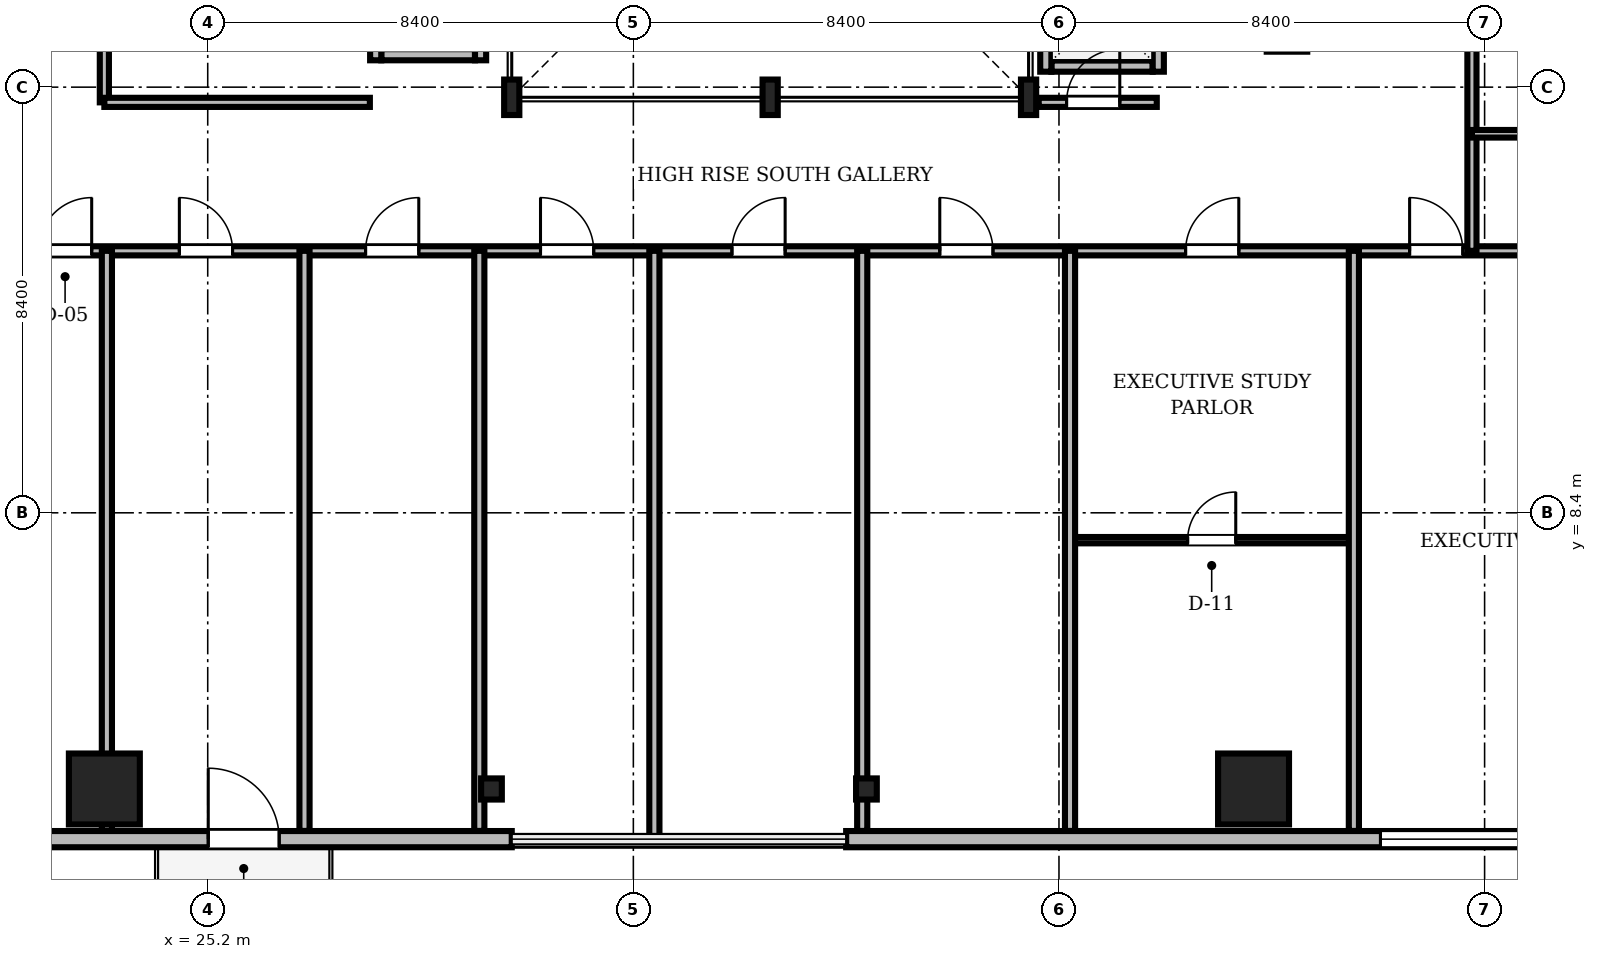
"""IFC4 building model, lengths in metres.
Left out: names, types, materials, properties, quantities, classifications, styles, units other than length and angle.
Written with IfcOpenShell. Run it as: python <this file> out.ifc"""

import sys

from ifc_helpers import new_model, si_unit, direction, frame, frame_2d, origin, origin_2d, place, context, subcontext, project, spatial, rectangle, i_section, extrude, source, transform, mapped, element, fill, save


model = new_model("IFC4")
c1 = context("Model", 3, precision=1e-05, world=origin(), true_north=direction((0.0, 1.0)))
c2 = subcontext(c1, "Body", "Model", "MODEL_VIEW")
j1 = project(units=[si_unit("LENGTHUNIT", "METRE"), si_unit("PLANEANGLEUNIT", "RADIAN")], contexts=[c1])
p1 = place(None, origin())
s1 = spatial("IfcSite", under=j1, at=p1, CompositionType="ELEMENT")
p2 = place(p1, origin())
s2 = spatial("IfcBuilding", under=s1, at=p2, CompositionType="ELEMENT")
p3 = place(p2, frame((0.0, 0.0, 218.55)))
s3 = spatial("IfcBuildingStorey", under=s2, at=p3, CompositionType="ELEMENT", Elevation=218.55)
m1 = source(origin(), c2, "Body", "SweptSolid", [
    extrude(i_section(OverallWidth=0.3, OverallDepth=0.7, WebThickness=0.017, FlangeThickness=0.032, FilletRadius=0.027, at=origin_2d()), origin(), (0.0, 0.0, 1.0), 3.53),
])
for number, where, z_axis, x_axis in (
    (1, (31.2, 16.6, 0.0), (0.0, 0.0, 1.0), (1.0, 0.0, 0.0)),
    (2, (36.3, 16.6, 0.0), (0.0, 0.0, 1.0), (1.0, 0.0, 0.0)),
    (3, (41.4, 16.6, 0.0), (0.0, 0.0, 1.0), (1.0, 0.0, 0.0)),
):
    element("IfcColumn", number, at=place(p3, frame(where, z_axis=z_axis, x_axis=x_axis)), inside=s3, PredefinedType="COLUMN", context=c2, shape_type="MappedRepresentation", body=[
        mapped(m1, transform((0.0, 0.0, 0.0), scale=1.0)),
    ])
m2 = source(origin(), c2, "Body", "SweptSolid", [
    extrude(rectangle(XDim=1.4, YDim=1.4, at=origin_2d()), origin(), (0.0, 0.0, 1.0), 3.53),
])
for number, where, z_axis, x_axis in (
    (4, (23.16, 2.95, 0.0), (0.0, 0.0, 1.0), (1.0, 0.0, 0.0)),
    (5, (45.84, 2.95, 0.0), (0.0, 0.0, 1.0), (1.0, 0.0, 0.0)),
):
    element("IfcColumn", number, at=place(p3, frame(where, z_axis=z_axis, x_axis=x_axis)), inside=s3, PredefinedType="COLUMN", context=c2, shape_type="MappedRepresentation", body=[
        mapped(m2, transform((0.0, 0.0, 0.0), scale=1.0)),
    ])
m3 = source(origin(), c2, "Body", "SweptSolid", [
    extrude(i_section(OverallWidth=0.409, OverallDepth=0.417, WebThickness=0.021, FlangeThickness=0.033, FilletRadius=0.015, at=origin_2d()), origin(), (0.0, 0.0, 1.0), 3.53),
])
for number, where, z_axis, x_axis in (
    (6, (30.8, 2.95, 0.0), (0.0, 0.0, 1.0), (1.0, 0.0, 0.0)),
    (7, (38.2, 2.95, 0.0), (0.0, 0.0, 1.0), (1.0, 0.0, 0.0)),
):
    element("IfcColumn", number, at=place(p3, frame(where, z_axis=z_axis, x_axis=x_axis)), inside=s3, PredefinedType="COLUMN", context=c2, shape_type="MappedRepresentation", body=[
        mapped(m3, transform((0.0, 0.0, 0.0), scale=1.0)),
    ])
m4 = source(origin(), c2, "Body", "SweptSolid", [
    extrude(rectangle(XDim=15.6, YDim=0.32, at=frame_2d((7.8, 0.0))), origin(), (0.0, 0.0, 1.0), 3.53),
])
p4 = place(p3, frame((15.6, 1.96, 0.0), z_axis=(0.0, 0.0, 1.0), x_axis=(1.0, 0.0, 0.0)))
e8 = element("IfcWall", 8, at=p4, inside=s3, PredefinedType="SOLIDWALL", context=c2, shape_type="MappedRepresentation", body=[
    mapped(m4, transform((0.0, 0.0, 0.0), scale=1.0)),
])
m5 = source(origin(), c2, "Body", "SweptSolid", [
    extrude(rectangle(XDim=1.4, YDim=2.3, at=frame_2d((0.7, 1.15))), frame((0.0, 0.17, 0.0), z_axis=(0.0, -1.0, 0.0), x_axis=(1.0, 0.0, 0.0)), (0.0, 0.0, 1.0), 0.34),
])
p5 = place(p4, frame((9.61, 0.0, 0.0)))
e9 = element("IfcOpeningElement", 9, at=p5, cuts=e8, PredefinedType="OPENING", context=c2, shape_type="MappedRepresentation", body=[
    mapped(m5, transform((0.0, 0.0, 0.0), scale=1.0)),
])
m6 = source(origin(), c2, "Body", "SweptSolid", [
    extrude(rectangle(XDim=2.8, YDim=2.4, at=frame_2d((1.4, 1.2))), frame((0.0, 0.17, 0.0), z_axis=(0.0, -1.0, 0.0), x_axis=(1.0, 0.0, 0.0)), (0.0, 0.0, 1.0), 0.34),
])
p6 = place(p4, frame((2.705, 0.0, 0.72)))
e10 = element("IfcOpeningElement", 10, at=p6, cuts=e8, PredefinedType="OPENING", context=c2, shape_type="MappedRepresentation", body=[
    mapped(m6, transform((0.0, 0.0, 0.0), scale=1.0)),
])
p7 = place(p3, frame((37.8, 1.96, 0.0), z_axis=(0.0, 0.0, 1.0), x_axis=(1.0, 0.0, 0.0)))
e11 = element("IfcWall", 11, at=p7, inside=s3, PredefinedType="SOLIDWALL", context=c2, shape_type="MappedRepresentation", body=[
    mapped(m4, transform((0.0, 0.0, 0.0), scale=1.0)),
])
p8 = place(p7, frame((10.545, 0.0, 0.72)))
e12 = element("IfcOpeningElement", 12, at=p8, cuts=e11, PredefinedType="OPENING", context=c2, shape_type="MappedRepresentation", body=[
    mapped(m6, transform((0.0, 0.0, 0.0), scale=1.0)),
])
m7 = source(origin(), c2, "Body", "SweptSolid", [
    extrude(rectangle(XDim=2.0, YDim=0.22, at=frame_2d((1.0, 0.0))), origin(), (0.0, 0.0, 1.0), 3.53),
])
p9 = place(p3, frame((41.85, 17.215, 0.0), z_axis=(0.0, 0.0, 1.0), x_axis=(1.0, 0.0, 0.0)))
e13 = element("IfcWall", 13, at=p9, inside=s3, PredefinedType="SOLIDWALL", context=c2, shape_type="MappedRepresentation", body=[
    mapped(m7, transform((0.0, 0.0, 0.0), scale=1.0)),
])
m8 = source(origin(), c2, "Body", "SweptSolid", [
    extrude(rectangle(XDim=2.19, YDim=0.22, at=frame_2d((1.095, 0.0))), origin(), (0.0, 0.0, 1.0), 3.53),
])
p10 = place(p3, frame((41.74, 17.105, 0.0), z_axis=(0.0, 0.0, 1.0), x_axis=(0.0, 1.0, 0.0)))
e14 = element("IfcWall", 14, at=p10, inside=s3, PredefinedType="SOLIDWALL", context=c2, shape_type="MappedRepresentation", body=[
    mapped(m8, transform((0.0, 0.0, 0.0), scale=1.0)),
])
p11 = place(p3, frame((43.96, 17.105, 0.0), z_axis=(0.0, 0.0, 1.0), x_axis=(0.0, 1.0, 0.0)))
e15 = element("IfcWall", 15, at=p11, inside=s3, PredefinedType="SOLIDWALL", context=c2, shape_type="MappedRepresentation", body=[
    mapped(m8, transform((0.0, 0.0, 0.0), scale=1.0)),
])
m9 = source(origin(), c2, "Body", "SweptSolid", [
    extrude(rectangle(XDim=1.1, YDim=2.2, at=frame_2d((0.55, 1.1))), frame((0.0, 0.12, 0.0), z_axis=(0.0, -1.0, 0.0), x_axis=(1.0, 0.0, 0.0)), (0.0, 0.0, 1.0), 0.24),
])
p12 = place(p11, frame((0.545, 0.0, 0.0)))
e16 = element("IfcOpeningElement", 16, at=p12, cuts=e15, PredefinedType="OPENING", context=c2, shape_type="MappedRepresentation", body=[
    mapped(m9, transform((0.0, 0.0, 0.0), scale=1.0)),
])
m10 = source(origin(), c2, "Body", "SweptSolid", [
    extrude(rectangle(XDim=1.85, YDim=0.22, at=frame_2d((0.925, 0.0))), origin(), (0.0, 0.0, 1.0), 2.972),
])
p13 = place(p3, frame((28.625, 17.44, 0.0), z_axis=(0.0, 0.0, 1.0), x_axis=(1.0, 0.0, 0.0)))
e17 = element("IfcWall", 17, at=p13, inside=s3, PredefinedType="SOLIDWALL", context=c2, shape_type="MappedRepresentation", body=[
    mapped(m10, transform((0.0, 0.0, 0.0), scale=1.0)),
])
m11 = source(origin(), c2, "Body", "SweptSolid", [
    extrude(rectangle(XDim=2.54, YDim=0.22, at=frame_2d((1.27, 0.0))), origin(), (0.0, 0.0, 1.0), 2.972),
])
p14 = place(p3, frame((28.515, 17.33, 0.0), z_axis=(0.0, 0.0, 1.0), x_axis=(0.0, 1.0, 0.0)))
e18 = element("IfcWall", 18, at=p14, inside=s3, PredefinedType="SOLIDWALL", context=c2, shape_type="MappedRepresentation", body=[
    mapped(m11, transform((0.0, 0.0, 0.0), scale=1.0)),
])
m12 = source(origin(), c2, "Body", "SweptSolid", [
    extrude(rectangle(XDim=2.54, YDim=0.22, at=frame_2d((1.27, 0.0))), origin(), (0.0, 0.0, 1.0), 3.53),
])
p15 = place(p3, frame((30.585, 17.33, 0.0), z_axis=(0.0, 0.0, 1.0), x_axis=(0.0, 1.0, 0.0)))
e19 = element("IfcWall", 19, at=p15, inside=s3, PredefinedType="SOLIDWALL", context=c2, shape_type="MappedRepresentation", body=[
    mapped(m12, transform((0.0, 0.0, 0.0), scale=1.0)),
])
m13 = source(origin(), c2, "Body", "SweptSolid", [
    extrude(rectangle(XDim=46.156, YDim=0.18, at=frame_2d((23.078, 0.0))), origin(), (0.0, 0.0, 1.0), 2.772),
])
p16 = place(p3, frame((11.422, 13.57, 0.0), z_axis=(0.0, 0.0, 1.0), x_axis=(1.0, 0.0, 0.0)))
e20 = element("IfcWall", 20, at=p16, inside=s3, PredefinedType="PARTITIONING", context=c2, shape_type="MappedRepresentation", body=[
    mapped(m13, transform((0.0, 0.0, 0.0), scale=1.0)),
])
m14 = source(origin(), c2, "Body", "SweptSolid", [
    extrude(rectangle(XDim=1.05, YDim=2.2, at=frame_2d((0.525, 1.1))), frame((0.0, 0.1, 0.0), z_axis=(0.0, -1.0, 0.0), x_axis=(1.0, 0.0, 0.0)), (0.0, 0.0, 1.0), 0.2),
])
p17 = place(p16, frame((10.438, 0.0, 0.0)))
e21 = element("IfcOpeningElement", 21, at=p17, cuts=e20, PredefinedType="OPENING", context=c2, shape_type="MappedRepresentation", body=[
    mapped(m14, transform((0.0, 0.0, 0.0), scale=1.0)),
])
p18 = place(p16, frame((13.218, 0.0, 0.0)))
e22 = element("IfcOpeningElement", 22, at=p18, cuts=e20, PredefinedType="OPENING", context=c2, shape_type="MappedRepresentation", body=[
    mapped(m14, transform((0.0, 0.0, 0.0), scale=1.0)),
])
p19 = place(p16, frame((16.893, 0.0, 0.0)))
e23 = element("IfcOpeningElement", 23, at=p19, cuts=e20, PredefinedType="OPENING", context=c2, shape_type="MappedRepresentation", body=[
    mapped(m14, transform((0.0, 0.0, 0.0), scale=1.0)),
])
p20 = place(p16, frame((20.346, 0.0, 0.0)))
e24 = element("IfcOpeningElement", 24, at=p20, cuts=e20, PredefinedType="OPENING", context=c2, shape_type="MappedRepresentation", body=[
    mapped(m14, transform((0.0, 0.0, 0.0), scale=1.0)),
])
p21 = place(p16, frame((24.124, 0.0, 0.0)))
e25 = element("IfcOpeningElement", 25, at=p21, cuts=e20, PredefinedType="OPENING", context=c2, shape_type="MappedRepresentation", body=[
    mapped(m14, transform((0.0, 0.0, 0.0), scale=1.0)),
])
p22 = place(p16, frame((28.226, 0.0, 0.0)))
e26 = element("IfcOpeningElement", 26, at=p22, cuts=e20, PredefinedType="OPENING", context=c2, shape_type="MappedRepresentation", body=[
    mapped(m14, transform((0.0, 0.0, 0.0), scale=1.0)),
])
p23 = place(p16, frame((33.077, 0.0, 0.0)))
e27 = element("IfcOpeningElement", 27, at=p23, cuts=e20, PredefinedType="OPENING", context=c2, shape_type="MappedRepresentation", body=[
    mapped(m14, transform((0.0, 0.0, 0.0), scale=1.0)),
])
p24 = place(p16, frame((37.498, 0.0, 0.0)))
e28 = element("IfcOpeningElement", 28, at=p24, cuts=e20, PredefinedType="OPENING", context=c2, shape_type="MappedRepresentation", body=[
    mapped(m14, transform((0.0, 0.0, 0.0), scale=1.0)),
])
m15 = source(origin(), c2, "Body", "SweptSolid", [
    extrude(rectangle(XDim=27.53, YDim=0.18, at=frame_2d((13.765, 0.0))), origin(), (0.0, 0.0, 1.0), 2.972),
])
p25 = place(p3, frame((50.15, 13.57, 0.0), z_axis=(0.0, 0.0, 1.0), x_axis=(0.0, 1.0, 0.0)))
e29 = element("IfcWall", 29, at=p25, inside=s3, PredefinedType="PARTITIONING", context=c2, shape_type="MappedRepresentation", body=[
    mapped(m15, transform((0.0, 0.0, 0.0), scale=1.0)),
])
p26 = place(p25, frame((5.217, 0.0, 0.0)))
e30 = element("IfcOpeningElement", 30, at=p26, cuts=e29, PredefinedType="OPENING", context=c2, shape_type="MappedRepresentation", body=[
    mapped(m14, transform((0.0, 0.0, 0.0), scale=1.0)),
])
p27 = place(p25, frame((14.32, 0.0, 0.0)))
e31 = element("IfcOpeningElement", 31, at=p27, cuts=e29, PredefinedType="OPENING", context=c2, shape_type="MappedRepresentation", body=[
    mapped(m14, transform((0.0, 0.0, 0.0), scale=1.0)),
])
p28 = place(p25, frame((23.423, 0.0, 0.0)))
e32 = element("IfcOpeningElement", 32, at=p28, cuts=e29, PredefinedType="OPENING", context=c2, shape_type="MappedRepresentation", body=[
    mapped(m14, transform((0.0, 0.0, 0.0), scale=1.0)),
])
m16 = source(origin(), c2, "Body", "SweptSolid", [
    extrude(rectangle(XDim=5.602, YDim=0.125, at=frame_2d((2.801, 0.0))), origin(), (0.0, 0.0, 1.0), 2.972),
])
p29 = place(p3, frame((42.218, 7.86, 0.0), z_axis=(0.0, 0.0, 1.0), x_axis=(1.0, 0.0, 0.0)))
e33 = element("IfcWall", 33, at=p29, inside=s3, PredefinedType="PARTITIONING", context=c2, shape_type="MappedRepresentation", body=[
    mapped(m16, transform((0.0, 0.0, 0.0), scale=1.0)),
])
m17 = source(origin(), c2, "Body", "SweptSolid", [
    extrude(rectangle(XDim=0.95, YDim=2.15, at=frame_2d((0.475, 1.075))), frame((0.0, 0.073, 0.0), z_axis=(0.0, -1.0, 0.0), x_axis=(1.0, 0.0, 0.0)), (0.0, 0.0, 1.0), 0.145),
])
p30 = place(p29, frame((2.321, 0.0, 0.0)))
e34 = element("IfcOpeningElement", 34, at=p30, cuts=e33, PredefinedType="OPENING", context=c2, shape_type="MappedRepresentation", body=[
    mapped(m17, transform((0.0, 0.0, 0.0), scale=1.0)),
])
m18 = source(origin(), c2, "Body", "SweptSolid", [
    extrude(rectangle(XDim=3.55, YDim=0.18, at=frame_2d((1.775, 0.0))), origin(), (0.0, 0.0, 1.0), 2.972),
])
p31 = place(p3, frame((23.16, 16.5, 0.0), z_axis=(0.0, 0.0, 1.0), x_axis=(0.0, 1.0, 0.0)))
e35 = element("IfcWall", 35, at=p31, inside=s3, PredefinedType="PARTITIONING", context=c2, shape_type="MappedRepresentation", body=[
    mapped(m18, transform((0.0, 0.0, 0.0), scale=1.0)),
])
p32 = place(p31, frame((1.15, 0.0, 0.0)))
e36 = element("IfcOpeningElement", 36, at=p32, cuts=e35, PredefinedType="OPENING", context=c2, shape_type="MappedRepresentation", body=[
    mapped(m14, transform((0.0, 0.0, 0.0), scale=1.0)),
])
m19 = source(origin(), c2, "Body", "SweptSolid", [
    extrude(rectangle(XDim=2.33, YDim=0.18, at=frame_2d((1.165, 0.0))), origin(), (0.0, 0.0, 1.0), 2.972),
])
p33 = place(p3, frame((41.6, 16.5, 0.0), z_axis=(0.0, 0.0, 1.0), x_axis=(1.0, 0.0, 0.0)))
e37 = element("IfcWall", 37, at=p33, inside=s3, PredefinedType="PARTITIONING", context=c2, shape_type="MappedRepresentation", body=[
    mapped(m19, transform((0.0, 0.0, 0.0), scale=1.0)),
])
p34 = place(p33, frame((0.55, 0.0, 0.0)))
e38 = element("IfcOpeningElement", 38, at=p34, cuts=e37, PredefinedType="OPENING", context=c2, shape_type="MappedRepresentation", body=[
    mapped(m14, transform((0.0, 0.0, 0.0), scale=1.0)),
])
m20 = source(origin(), c2, "Body", "SweptSolid", [
    extrude(rectangle(XDim=11.448, YDim=0.2, at=frame_2d((5.724, 0.0))), origin(), (0.0, 0.0, 1.0), 2.772),
])
for number, where, z_axis, x_axis in (
    (39, (23.21, 2.122, 0.0), (0.0, 0.0, 1.0), (0.0, 1.0, 0.0)),
    (40, (27.11, 2.122, 0.0), (0.0, 0.0, 1.0), (0.0, 1.0, 0.0)),
    (41, (30.56, 2.122, 0.0), (0.0, 0.0, 1.0), (0.0, 1.0, 0.0)),
):
    element("IfcWall", number, at=place(p3, frame(where, z_axis=z_axis, x_axis=x_axis)), inside=s3, PredefinedType="PARTITIONING", context=c2, shape_type="MappedRepresentation", body=[
        mapped(m20, transform((0.0, 0.0, 0.0), scale=1.0)),
    ])
m21 = source(origin(), c2, "Body", "SweptSolid", [
    extrude(rectangle(XDim=11.64, YDim=0.2, at=frame_2d((5.82, 0.0))), origin(), (0.0, 0.0, 1.0), 2.772),
])
p35 = place(p3, frame((34.015, 1.93, 0.0), z_axis=(0.0, 0.0, 1.0), x_axis=(0.0, 1.0, 0.0)))
e42 = element("IfcWall", 42, at=p35, inside=s3, PredefinedType="PARTITIONING", context=c2, shape_type="MappedRepresentation", body=[
    mapped(m21, transform((0.0, 0.0, 0.0), scale=1.0)),
])
for number, where, z_axis, x_axis in (
    (43, (38.117, 2.122, 0.0), (0.0, 0.0, 1.0), (0.0, 1.0, 0.0)),
    (44, (42.218, 2.122, 0.0), (0.0, 0.0, 1.0), (0.0, 1.0, 0.0)),
    (45, (47.82, 2.122, 0.0), (0.0, 0.0, 1.0), (0.0, 1.0, 0.0)),
):
    element("IfcWall", number, at=place(p3, frame(where, z_axis=z_axis, x_axis=x_axis)), inside=s3, PredefinedType="PARTITIONING", context=c2, shape_type="MappedRepresentation", body=[
        mapped(m20, transform((0.0, 0.0, 0.0), scale=1.0)),
    ])
m22 = source(origin(), c2, "Body", "SweptSolid", [
    extrude(rectangle(XDim=5.24, YDim=0.18, at=frame_2d((2.62, 0.0))), origin(), (0.0, 0.0, 1.0), 3.53),
])
p36 = place(p3, frame((23.16, 16.5, 0.0), z_axis=(0.0, 0.0, 1.0), x_axis=(1.0, 0.0, 0.0)))
e46 = element("IfcWall", 46, at=p36, inside=s3, PredefinedType="PARTITIONING", context=c2, shape_type="MappedRepresentation", body=[
    mapped(m22, transform((0.0, 0.0, 0.0), scale=1.0)),
])
m23 = source(origin(), c2, "Body", "SweptSolid", [
    extrude(rectangle(XDim=2.36, YDim=0.15, at=frame_2d((1.18, 0.0))), origin(), (0.0, 0.0, 1.0), 3.53),
])
p37 = place(p3, frame((50.15, 15.88, 0.0), z_axis=(0.0, 0.0, 1.0), x_axis=(1.0, 0.0, 0.0)))
e47 = element("IfcWall", 47, at=p37, inside=s3, PredefinedType="PARTITIONING", context=c2, shape_type="MappedRepresentation", body=[
    mapped(m23, transform((0.0, 0.0, 0.0), scale=1.0)),
])
m24 = source(origin(), c2, "Body", "SweptSolid", [
    extrude(rectangle(XDim=1.4, YDim=2.3, at=frame_2d((0.7, 1.15))), frame((0.0, 0.025, 0.0), z_axis=(0.0, -1.0, 0.0), x_axis=(1.0, 0.0, 0.0)), (0.0, 0.0, 1.0), 0.05),
])
p38 = place(p5, frame((1.4, 0.0, 0.0), z_axis=(0.0, 0.0, 1.0), x_axis=(-1.0, 0.0, 0.0)))
e48 = element("IfcDoor", 48, at=p38, inside=s3, OperationType="DOUBLE_DOOR_SLIDING", PredefinedType="DOOR", context=c2, shape_type="MappedRepresentation", body=[
    mapped(m24, transform((0.0, 0.0, 0.0), scale=1.0)),
])
fill(e9, e48)
m25 = source(origin(), c2, "Body", "SweptSolid", [
    extrude(rectangle(XDim=2.8, YDim=2.4, at=frame_2d((1.4, 1.2))), frame((0.0, 0.03, 0.0), z_axis=(0.0, -1.0, 0.0), x_axis=(1.0, 0.0, 0.0)), (0.0, 0.0, 1.0), 0.06),
])
p39 = place(p8, origin())
e49 = element("IfcWindow", 49, at=p39, inside=s3, PartitioningType="SINGLE_PANEL", PredefinedType="WINDOW", context=c2, shape_type="MappedRepresentation", body=[
    mapped(m25, transform((0.0, 0.0, 0.0), scale=1.0)),
])
fill(e12, e49)
m26 = source(origin(), c2, "Body", "SweptSolid", [
    extrude(rectangle(XDim=1.05, YDim=2.2, at=frame_2d((0.525, 1.1))), frame((0.0, 0.025, 0.0), z_axis=(0.0, -1.0, 0.0), x_axis=(1.0, 0.0, 0.0)), (0.0, 0.0, 1.0), 0.05),
])
p40 = place(p17, origin())
e50 = element("IfcDoor", 50, at=p40, inside=s3, OperationType="SINGLE_SWING_RIGHT", PredefinedType="DOOR", context=c2, shape_type="MappedRepresentation", body=[
    mapped(m26, transform((0.0, 0.0, 0.0), scale=1.0)),
])
fill(e21, e50)
p41 = place(p18, origin())
e51 = element("IfcDoor", 51, at=p41, inside=s3, OperationType="SINGLE_SWING_LEFT", PredefinedType="DOOR", context=c2, shape_type="MappedRepresentation", body=[
    mapped(m26, transform((0.0, 0.0, 0.0), scale=1.0)),
])
fill(e22, e51)
p42 = place(p19, origin())
e52 = element("IfcDoor", 52, at=p42, inside=s3, OperationType="SINGLE_SWING_RIGHT", PredefinedType="DOOR", context=c2, shape_type="MappedRepresentation", body=[
    mapped(m26, transform((0.0, 0.0, 0.0), scale=1.0)),
])
fill(e23, e52)
p43 = place(p20, origin())
e53 = element("IfcDoor", 53, at=p43, inside=s3, OperationType="SINGLE_SWING_LEFT", PredefinedType="DOOR", context=c2, shape_type="MappedRepresentation", body=[
    mapped(m26, transform((0.0, 0.0, 0.0), scale=1.0)),
])
fill(e24, e53)
p44 = place(p21, origin())
e54 = element("IfcDoor", 54, at=p44, inside=s3, OperationType="SINGLE_SWING_RIGHT", PredefinedType="DOOR", context=c2, shape_type="MappedRepresentation", body=[
    mapped(m26, transform((0.0, 0.0, 0.0), scale=1.0)),
])
fill(e25, e54)
p45 = place(p22, origin())
e55 = element("IfcDoor", 55, at=p45, inside=s3, OperationType="SINGLE_SWING_LEFT", PredefinedType="DOOR", context=c2, shape_type="MappedRepresentation", body=[
    mapped(m26, transform((0.0, 0.0, 0.0), scale=1.0)),
])
fill(e26, e55)
p46 = place(p23, origin())
e56 = element("IfcDoor", 56, at=p46, inside=s3, OperationType="SINGLE_SWING_RIGHT", PredefinedType="DOOR", context=c2, shape_type="MappedRepresentation", body=[
    mapped(m26, transform((0.0, 0.0, 0.0), scale=1.0)),
])
fill(e27, e56)
p47 = place(p24, origin())
e57 = element("IfcDoor", 57, at=p47, inside=s3, OperationType="SINGLE_SWING_LEFT", PredefinedType="DOOR", context=c2, shape_type="MappedRepresentation", body=[
    mapped(m26, transform((0.0, 0.0, 0.0), scale=1.0)),
])
fill(e28, e57)
m27 = source(origin(), c2, "Body", "SweptSolid", [
    extrude(rectangle(XDim=0.95, YDim=2.15, at=frame_2d((0.475, 1.075))), frame((0.0, 0.025, 0.0), z_axis=(0.0, -1.0, 0.0), x_axis=(1.0, 0.0, 0.0)), (0.0, 0.0, 1.0), 0.05),
])
p48 = place(p30, origin())
e58 = element("IfcDoor", 58, at=p48, inside=s3, OperationType="SINGLE_SWING_RIGHT", PredefinedType="DOOR", context=c2, shape_type="MappedRepresentation", body=[
    mapped(m27, transform((0.0, 0.0, 0.0), scale=1.0)),
])
fill(e34, e58)
p49 = place(p34, origin())
e59 = element("IfcDoor", 59, at=p49, inside=s3, OperationType="SINGLE_SWING_RIGHT", PredefinedType="DOOR", context=c2, shape_type="MappedRepresentation", body=[
    mapped(m26, transform((0.0, 0.0, 0.0), scale=1.0)),
])
fill(e38, e59)
save(model, sys.argv[1])
